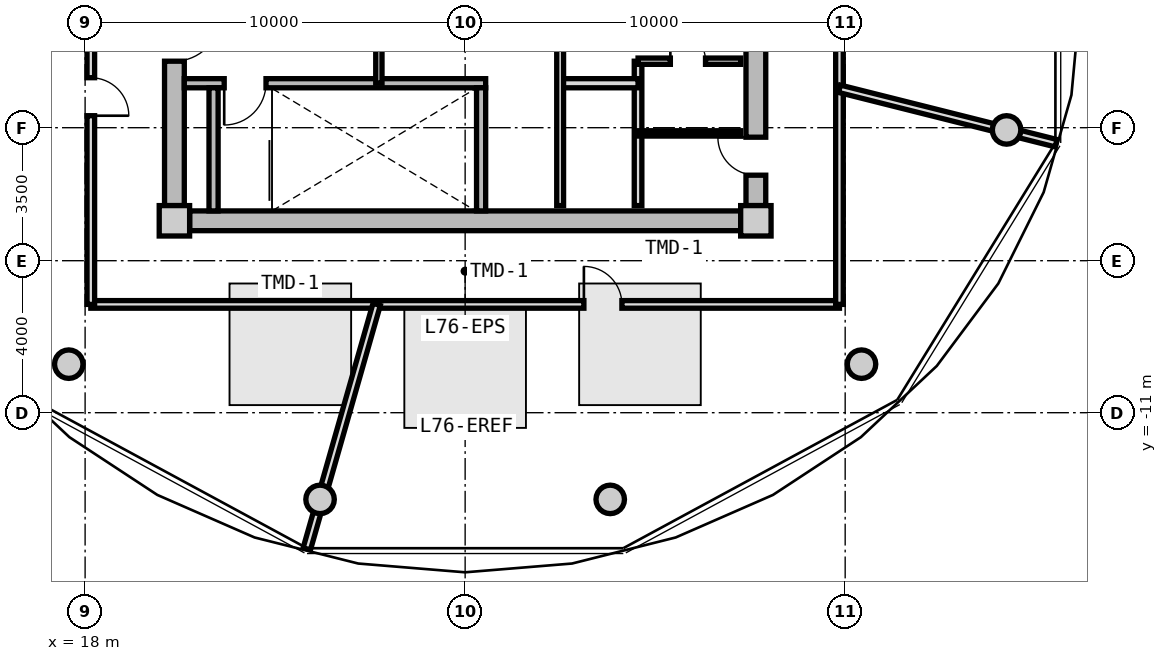
"""IFC4 building model, lengths in metres.
Left out: names, types, materials, properties, quantities, classifications, styles, units other than length and angle.
Written with IfcOpenShell. Run it as: python <this file> out.ifc"""

import sys

from ifc_helpers import new_model, si_unit, direction, frame, frame_2d, origin, origin_2d, place, context, subcontext, project, spatial, rectangle, circle, extrude, source, transform, mapped, element, fill, save


model = new_model("IFC4")
c1 = context("Model", 3, precision=1e-05, world=origin(), true_north=direction((0.0, 1.0)))
c2 = subcontext(c1, "Body", "Model", "MODEL_VIEW")
j1 = project(units=[si_unit("LENGTHUNIT", "METRE"), si_unit("PLANEANGLEUNIT", "RADIAN")], contexts=[c1])
p1 = place(None, origin())
s1 = spatial("IfcSite", under=j1, at=p1, CompositionType="ELEMENT")
p2 = place(p1, origin())
s2 = spatial("IfcBuilding", under=s1, at=p2, CompositionType="ELEMENT")
p3 = place(p2, frame((0.0, 0.0, 244.4)))
s3 = spatial("IfcBuildingStorey", under=s2, at=p3, CompositionType="ELEMENT", Elevation=244.4)
m1 = source(origin(), c2, "Body", "SweptSolid", [
    extrude(rectangle(XDim=0.8, YDim=0.8, at=origin_2d()), origin(), (0.0, 0.0, 1.0), 5.45),
])
for number, where, z_axis, x_axis in (
    (1, (20.35, -5.95, 0.0), (0.0, 0.0, 1.0), (1.0, 0.0, 0.0)),
    (2, (35.65, -5.95, 0.0), (0.0, 0.0, 1.0), (1.0, 0.0, 0.0)),
):
    element("IfcColumn", number, at=place(p3, frame(where, z_axis=z_axis, x_axis=x_axis)), inside=s3, PredefinedType="COLUMN", context=c2, shape_type="MappedRepresentation", body=[
        mapped(m1, transform((0.0, 0.0, 0.0), x_axis=(1.0, 0.0, 0.0), y_axis=(0.0, 1.0, 0.0), z_axis=(0.0, 0.0, 1.0), scale=1.0)),
    ])
m2 = source(origin(), c2, "Body", "SweptSolid", [
    extrude(rectangle(XDim=14.5, YDim=0.52, at=frame_2d((7.25, 0.0))), origin(), (0.0, 0.0, 1.0), 5.175),
])
p4 = place(p3, frame((35.25, -5.95, 0.0), z_axis=(0.0, 0.0, 1.0), x_axis=(-1.0, 0.0, 0.0)))
e3 = element("IfcWall", 3, at=p4, inside=s3, PredefinedType="SHEAR", context=c2, shape_type="MappedRepresentation", body=[
    mapped(m2, transform((0.0, 0.0, 0.0), x_axis=(1.0, 0.0, 0.0), y_axis=(0.0, 1.0, 0.0), z_axis=(0.0, 0.0, 1.0), scale=1.0)),
])
m3 = source(origin(), c2, "Body", "SweptSolid", [
    extrude(rectangle(XDim=11.1, YDim=0.52, at=frame_2d((5.55, 0.0))), origin(), (0.0, 0.0, 1.0), 5.175),
])
p5 = place(p3, frame((20.35, -5.55, 0.0), z_axis=(0.0, 0.0, 1.0), x_axis=(0.0, 1.0, 0.0)))
e4 = element("IfcWall", 4, at=p5, inside=s3, PredefinedType="SHEAR", context=c2, shape_type="MappedRepresentation", body=[
    mapped(m3, transform((0.0, 0.0, 0.0), x_axis=(1.0, 0.0, 0.0), y_axis=(0.0, 1.0, 0.0), z_axis=(0.0, 0.0, 1.0), scale=1.0)),
])
p6 = place(p5, frame((3.8, 0.0, 0.0)))
e5 = element("IfcOpeningElement", 5, at=p6, cuts=e4, PredefinedType="OPENING", context=c2, shape_type="SweptSolid", body=[
    extrude(rectangle(XDim=1.2, YDim=2.15, at=frame_2d((0.6, 1.075))), frame((0.0, 0.27, 0.0), z_axis=(0.0, -1.0, 0.0), x_axis=(1.0, 0.0, 0.0)), (0.0, 0.0, 1.0), 0.54),
])
p7 = place(p3, frame((35.65, 5.55, 0.0), z_axis=(0.0, 0.0, 1.0), x_axis=(0.0, -1.0, 0.0)))
e6 = element("IfcWall", 6, at=p7, inside=s3, PredefinedType="SHEAR", context=c2, shape_type="MappedRepresentation", body=[
    mapped(m3, transform((0.0, 0.0, 0.0), x_axis=(1.0, 0.0, 0.0), y_axis=(0.0, 1.0, 0.0), z_axis=(0.0, 0.0, 1.0), scale=1.0)),
])
p8 = place(p7, frame((5.65, 0.0, 0.0)))
e7 = element("IfcOpeningElement", 7, at=p8, cuts=e6, PredefinedType="OPENING", context=c2, shape_type="SweptSolid", body=[
    extrude(rectangle(XDim=1.2, YDim=2.15, at=frame_2d((0.6, 1.075))), frame((0.0, 0.27, 0.0), z_axis=(0.0, -1.0, 0.0), x_axis=(1.0, 0.0, 0.0)), (0.0, 0.0, 1.0), 0.54),
])
p9 = place(p7, frame((9.3, 0.0, 0.0)))
e8 = element("IfcOpeningElement", 8, at=p9, cuts=e6, PredefinedType="OPENING", context=c2, shape_type="SweptSolid", body=[
    extrude(rectangle(XDim=1.0, YDim=2.1, at=frame_2d((0.5, 1.05))), frame((0.0, 0.27, 0.0), z_axis=(0.0, -1.0, 0.0), x_axis=(1.0, 0.0, 0.0)), (0.0, 0.0, 1.0), 0.54),
])
m4 = source(origin(), c2, "Body", "SweptSolid", [
    extrude(circle(Radius=0.375, at=origin_2d()), origin(), (0.0, 0.0, 1.0), 5.45),
])
for number, where, z_axis, x_axis in (
    (9, (17.57, -9.723, 0.0), (0.0, 0.0, 1.0), (1.0, 0.0, 0.0)),
    (10, (24.182, -13.281, 0.0), (0.0, 0.0, 1.0), (1.0, 0.0, 0.0)),
    (11, (31.818, -13.281, 0.0), (0.0, 0.0, 1.0), (1.0, 0.0, 0.0)),
    (12, (38.43, -9.723, 0.0), (0.0, 0.0, 1.0), (1.0, 0.0, 0.0)),
    (13, (42.247, -3.559, 0.0), (0.0, 0.0, 1.0), (1.0, 0.0, 0.0)),
):
    element("IfcColumn", number, at=place(p3, frame(where, z_axis=z_axis, x_axis=x_axis)), inside=s3, PredefinedType="COLUMN", context=c2, shape_type="MappedRepresentation", body=[
        mapped(m4, transform((0.0, 0.0, 0.0), x_axis=(1.0, 0.0, 0.0), y_axis=(0.0, 1.0, 0.0), z_axis=(0.0, 0.0, 1.0), scale=1.0)),
    ])
m5 = source(origin(), c2, "Body", "SweptSolid", [
    extrude(rectangle(XDim=7.93, YDim=0.24, at=frame_2d((3.965, 0.0))), origin(), (0.0, 0.0, 1.0), 5.175),
])
p10 = place(p3, frame((20.61, -2.33, 0.0), z_axis=(0.0, 0.0, 1.0), x_axis=(1.0, 0.0, 0.0)))
e14 = element("IfcWall", 14, at=p10, inside=s3, PredefinedType="PARTITIONING", context=c2, shape_type="MappedRepresentation", body=[
    mapped(m5, transform((0.0, 0.0, 0.0), x_axis=(1.0, 0.0, 0.0), y_axis=(0.0, 1.0, 0.0), z_axis=(0.0, 0.0, 1.0), scale=1.0)),
])
p11 = place(p10, frame((1.05, 0.0, 0.0)))
e15 = element("IfcOpeningElement", 15, at=p11, cuts=e14, PredefinedType="OPENING", context=c2, shape_type="SweptSolid", body=[
    extrude(rectangle(XDim=1.1, YDim=2.15, at=frame_2d((0.55, 1.075))), frame((0.0, 0.13, 0.0), z_axis=(0.0, -1.0, 0.0), x_axis=(1.0, 0.0, 0.0)), (0.0, 0.0, 1.0), 0.26),
])
m6 = source(origin(), c2, "Body", "SweptSolid", [
    extrude(rectangle(XDim=3.24, YDim=0.24, at=frame_2d((1.62, 0.0))), origin(), (0.0, 0.0, 1.0), 5.175),
])
for number, where, z_axis, x_axis in (
    (16, (21.38, -5.69, 0.0), (0.0, 0.0, 1.0), (0.0, 1.0, 0.0)),
    (17, (28.42, -5.69, 0.0), (0.0, 0.0, 1.0), (0.0, 1.0, 0.0)),
):
    element("IfcWall", number, at=place(p3, frame(where, z_axis=z_axis, x_axis=x_axis)), inside=s3, PredefinedType="PARTITIONING", context=c2, shape_type="MappedRepresentation", body=[
        mapped(m6, transform((0.0, 0.0, 0.0), x_axis=(1.0, 0.0, 0.0), y_axis=(0.0, 1.0, 0.0), z_axis=(0.0, 0.0, 1.0), scale=1.0)),
    ])
m7 = source(origin(), c2, "Body", "SweptSolid", [
    extrude(rectangle(XDim=3.8, YDim=0.2, at=frame_2d((1.9, 0.0))), origin(), (0.0, 0.0, 1.0), 5.16),
])
p12 = place(p3, frame((32.55, -5.55, 0.0), z_axis=(0.0, 0.0, 1.0), x_axis=(0.0, 1.0, 0.0)))
e18 = element("IfcWall", 18, at=p12, inside=s3, PredefinedType="PARTITIONING", context=c2, shape_type="MappedRepresentation", body=[
    mapped(m7, transform((0.0, 0.0, 0.0), x_axis=(1.0, 0.0, 0.0), y_axis=(0.0, 1.0, 0.0), z_axis=(0.0, 0.0, 1.0), scale=1.0)),
])
m8 = source(origin(), c2, "Body", "SweptSolid", [
    extrude(rectangle(XDim=2.05, YDim=0.24, at=frame_2d((1.025, 0.0))), origin(), (0.0, 0.0, 1.0), 5.16),
])
p13 = place(p3, frame((30.5, -2.33, 0.0), z_axis=(0.0, 0.0, 1.0), x_axis=(1.0, 0.0, 0.0)))
e19 = element("IfcWall", 19, at=p13, inside=s3, PredefinedType="PARTITIONING", context=c2, shape_type="MappedRepresentation", body=[
    mapped(m8, transform((0.0, 0.0, 0.0), x_axis=(1.0, 0.0, 0.0), y_axis=(0.0, 1.0, 0.0), z_axis=(0.0, 0.0, 1.0), scale=1.0)),
])
m9 = source(origin(), c2, "Body", "SweptSolid", [
    extrude(rectangle(XDim=4.2, YDim=0.18, at=frame_2d((2.1, 0.0))), origin(), (0.0, 0.0, 1.0), 5.16),
])
p14 = place(p3, frame((30.5, -5.55, 0.0), z_axis=(0.0, 0.0, 1.0), x_axis=(0.0, 1.0, 0.0)))
e20 = element("IfcWall", 20, at=p14, inside=s3, PredefinedType="PARTITIONING", context=c2, shape_type="MappedRepresentation", body=[
    mapped(m9, transform((0.0, 0.0, 0.0), x_axis=(1.0, 0.0, 0.0), y_axis=(0.0, 1.0, 0.0), z_axis=(0.0, 0.0, 1.0), scale=1.0)),
])
m10 = source(origin(), c2, "Body", "SweptSolid", [
    extrude(rectangle(XDim=0.98, YDim=0.165, at=frame_2d((0.49, 0.0))), origin(), (0.0, 0.0, 1.0), 5.16),
])
p15 = place(p3, frame((25.73, -2.33, 0.0), z_axis=(0.0, 0.0, 1.0), x_axis=(0.0, 1.0, 0.0)))
e21 = element("IfcWall", 21, at=p15, inside=s3, PredefinedType="PARTITIONING", context=c2, shape_type="MappedRepresentation", body=[
    mapped(m10, transform((0.0, 0.0, 0.0), x_axis=(1.0, 0.0, 0.0), y_axis=(0.0, 1.0, 0.0), z_axis=(0.0, 0.0, 1.0), scale=1.0)),
])
m11 = source(origin(), c2, "Body", "SweptSolid", [
    extrude(rectangle(XDim=2.7, YDim=0.165, at=frame_2d((1.35, 0.0))), origin(), (0.0, 0.0, 1.0), 5.16),
])
p16 = place(p3, frame((32.55, -1.75, 0.0), z_axis=(0.0, 0.0, 1.0), x_axis=(1.0, 0.0, 0.0)))
e22 = element("IfcWall", 22, at=p16, inside=s3, PredefinedType="PARTITIONING", context=c2, shape_type="MappedRepresentation", body=[
    mapped(m11, transform((0.0, 0.0, 0.0), x_axis=(1.0, 0.0, 0.0), y_axis=(0.0, 1.0, 0.0), z_axis=(0.0, 0.0, 1.0), scale=1.0)),
])
p17 = place(p16, frame((0.85, 0.0, 0.0)))
e23 = element("IfcOpeningElement", 23, at=p17, cuts=e22, PredefinedType="OPENING", context=c2, shape_type="SweptSolid", body=[
    extrude(rectangle(XDim=0.925, YDim=2.1, at=frame_2d((0.462, 1.05))), frame((0.0, 0.093, 0.0), z_axis=(0.0, -1.0, 0.0), x_axis=(1.0, 0.0, 0.0)), (0.0, 0.0, 1.0), 0.185),
])
m12 = source(origin(), c2, "Body", "SweptSolid", [
    extrude(rectangle(XDim=2.7, YDim=0.14, at=frame_2d((1.35, 0.0))), origin(), (0.0, 0.0, 1.0), 5.16),
])
p18 = place(p3, frame((32.55, -3.65, 0.0), z_axis=(0.0, 0.0, 1.0), x_axis=(1.0, 0.0, 0.0)))
e24 = element("IfcWall", 24, at=p18, inside=s3, PredefinedType="PARTITIONING", context=c2, shape_type="MappedRepresentation", body=[
    mapped(m12, transform((0.0, 0.0, 0.0), x_axis=(1.0, 0.0, 0.0), y_axis=(0.0, 1.0, 0.0), z_axis=(0.0, 0.0, 1.0), scale=1.0)),
])
m13 = source(origin(), c2, "Body", "SweptSolid", [
    extrude(rectangle(XDim=19.7, YDim=0.2, at=frame_2d((9.85, 0.0))), origin(), (0.0, 0.0, 1.0), 5.16),
])
p19 = place(p3, frame((37.85, -8.15, 0.0), z_axis=(0.0, 0.0, 1.0), x_axis=(-1.0, 0.0, 0.0)))
e25 = element("IfcWall", 25, at=p19, inside=s3, PredefinedType="PARTITIONING", context=c2, shape_type="MappedRepresentation", body=[
    mapped(m13, transform((0.0, 0.0, 0.0), x_axis=(1.0, 0.0, 0.0), y_axis=(0.0, 1.0, 0.0), z_axis=(0.0, 0.0, 1.0), scale=1.0)),
])
p20 = place(p19, frame((5.725, 0.0, 0.0)))
e26 = element("IfcOpeningElement", 26, at=p20, cuts=e25, PredefinedType="OPENING", context=c2, shape_type="SweptSolid", body=[
    extrude(rectangle(XDim=1.0, YDim=2.1, at=frame_2d((0.5, 1.05))), frame((0.0, 0.11, 0.0), z_axis=(0.0, -1.0, 0.0), x_axis=(1.0, 0.0, 0.0)), (0.0, 0.0, 1.0), 0.22),
])
m14 = source(origin(), c2, "Body", "SweptSolid", [
    extrude(rectangle(XDim=16.3, YDim=0.2, at=frame_2d((8.15, 0.0))), origin(), (0.0, 0.0, 1.0), 5.16),
])
p21 = place(p3, frame((18.15, -8.15, 0.0), z_axis=(0.0, 0.0, 1.0), x_axis=(0.0, 1.0, 0.0)))
e27 = element("IfcWall", 27, at=p21, inside=s3, PredefinedType="PARTITIONING", context=c2, shape_type="MappedRepresentation", body=[
    mapped(m14, transform((0.0, 0.0, 0.0), x_axis=(1.0, 0.0, 0.0), y_axis=(0.0, 1.0, 0.0), z_axis=(0.0, 0.0, 1.0), scale=1.0)),
])
p22 = place(p21, frame((4.966, 0.0, 0.0)))
e28 = element("IfcOpeningElement", 28, at=p22, cuts=e27, PredefinedType="OPENING", context=c2, shape_type="SweptSolid", body=[
    extrude(rectangle(XDim=1.0, YDim=2.1, at=frame_2d((0.5, 1.05))), frame((0.0, 0.11, 0.0), z_axis=(0.0, -1.0, 0.0), x_axis=(1.0, 0.0, 0.0)), (0.0, 0.0, 1.0), 0.22),
])
p23 = place(p3, frame((37.85, 8.15, 0.0), z_axis=(0.0, 0.0, 1.0), x_axis=(0.0, -1.0, 0.0)))
e29 = element("IfcWall", 29, at=p23, inside=s3, PredefinedType="PARTITIONING", context=c2, shape_type="MappedRepresentation", body=[
    mapped(m14, transform((0.0, 0.0, 0.0), x_axis=(1.0, 0.0, 0.0), y_axis=(0.0, 1.0, 0.0), z_axis=(0.0, 0.0, 1.0), scale=1.0)),
])
p24 = place(p23, frame((4.966, 0.0, 0.0)))
e30 = element("IfcOpeningElement", 30, at=p24, cuts=e29, PredefinedType="OPENING", context=c2, shape_type="SweptSolid", body=[
    extrude(rectangle(XDim=1.0, YDim=2.1, at=frame_2d((0.5, 1.05))), frame((0.0, 0.11, 0.0), z_axis=(0.0, -1.0, 0.0), x_axis=(1.0, 0.0, 0.0)), (0.0, 0.0, 1.0), 0.22),
])
m15 = source(origin(), c2, "Body", "SweptSolid", [
    extrude(rectangle(XDim=6.693, YDim=0.2, at=frame_2d((3.347, 0.0))), origin(), (0.0, 0.0, 1.0), 4.76),
])
p25 = place(p3, frame((25.672, -8.15, 0.0), z_axis=(0.0, 0.0, 1.0), x_axis=(-0.2747066748, -0.96152807698, 0.0)))
e31 = element("IfcWall", 31, at=p25, inside=s3, PredefinedType="PARTITIONING", context=c2, shape_type="MappedRepresentation", body=[
    mapped(m15, transform((0.0, 0.0, 0.0), x_axis=(1.0, 0.0, 0.0), y_axis=(0.0, 1.0, 0.0), z_axis=(0.0, 0.0, 1.0), scale=1.0)),
])
m16 = source(origin(), c2, "Body", "SweptSolid", [
    extrude(rectangle(XDim=5.879, YDim=0.2, at=frame_2d((2.939, 0.0))), origin(), (0.0, 0.0, 1.0), 4.76),
])
p26 = place(p3, frame((37.85, -2.475, 0.0), z_axis=(0.0, 0.0, 1.0), x_axis=(0.96984127658, -0.24373735504, 0.0)))
e32 = element("IfcWall", 32, at=p26, inside=s3, PredefinedType="PARTITIONING", context=c2, shape_type="MappedRepresentation", body=[
    mapped(m16, transform((0.0, 0.0, 0.0), x_axis=(1.0, 0.0, 0.0), y_axis=(0.0, 1.0, 0.0), z_axis=(0.0, 0.0, 1.0), scale=1.0)),
])
m17 = source(origin(), c2, "Body", "SweptSolid", [
    extrude(rectangle(XDim=1.1, YDim=2.15, at=frame_2d((0.55, 1.075))), frame((0.0, 0.025, 0.0), z_axis=(0.0, -1.0, 0.0), x_axis=(1.0, 0.0, 0.0)), (0.0, 0.0, 1.0), 0.05),
])
p27 = place(p11, frame((1.1, 0.0, 0.0), z_axis=(0.0, 0.0, 1.0), x_axis=(-1.0, 0.0, 0.0)))
e33 = element("IfcDoor", 33, at=p27, inside=s3, OperationType="SINGLE_SWING_RIGHT", PredefinedType="DOOR", context=c2, shape_type="MappedRepresentation", body=[
    mapped(m17, transform((0.0, 0.0, 0.0), x_axis=(1.0, 0.0, 0.0), y_axis=(0.0, 1.0, 0.0), z_axis=(0.0, 0.0, 1.0), scale=1.0)),
])
fill(e15, e33)
m18 = source(origin(), c2, "Body", "SweptSolid", [
    extrude(rectangle(XDim=1.2, YDim=2.15, at=frame_2d((0.6, 1.075))), frame((0.0, 0.025, 0.0), z_axis=(0.0, -1.0, 0.0), x_axis=(1.0, 0.0, 0.0)), (0.0, 0.0, 1.0), 0.05),
])
p28 = place(p6, frame((1.2, 0.0, 0.0), z_axis=(0.0, 0.0, 1.0), x_axis=(-1.0, 0.0, 0.0)))
e34 = element("IfcDoor", 34, at=p28, inside=s3, OperationType="SINGLE_SWING_LEFT", PredefinedType="DOOR", context=c2, shape_type="MappedRepresentation", body=[
    mapped(m18, transform((0.0, 0.0, 0.0), x_axis=(1.0, 0.0, 0.0), y_axis=(0.0, 1.0, 0.0), z_axis=(0.0, 0.0, 1.0), scale=1.0)),
])
fill(e5, e34)
m19 = source(origin(), c2, "Body", "SweptSolid", [
    extrude(rectangle(XDim=0.925, YDim=2.1, at=frame_2d((0.462, 1.05))), frame((0.0, 0.025, 0.0), z_axis=(0.0, -1.0, 0.0), x_axis=(1.0, 0.0, 0.0)), (0.0, 0.0, 1.0), 0.05),
])
p29 = place(p17, origin())
e35 = element("IfcDoor", 35, at=p29, inside=s3, OperationType="SINGLE_SWING_LEFT", PredefinedType="DOOR", context=c2, shape_type="MappedRepresentation", body=[
    mapped(m19, transform((0.0, 0.0, 0.0), x_axis=(1.0, 0.0, 0.0), y_axis=(0.0, 1.0, 0.0), z_axis=(0.0, 0.0, 1.0), scale=1.0)),
])
fill(e23, e35)
m20 = source(origin(), c2, "Body", "SweptSolid", [
    extrude(rectangle(XDim=1.0, YDim=2.1, at=frame_2d((0.5, 1.05))), frame((0.0, 0.025, 0.0), z_axis=(0.0, -1.0, 0.0), x_axis=(1.0, 0.0, 0.0)), (0.0, 0.0, 1.0), 0.05),
])
p30 = place(p9, frame((1.0, 0.0, 0.0), z_axis=(0.0, 0.0, 1.0), x_axis=(-1.0, 0.0, 0.0)))
e36 = element("IfcDoor", 36, at=p30, inside=s3, OperationType="SINGLE_SWING_RIGHT", PredefinedType="DOOR", context=c2, shape_type="MappedRepresentation", body=[
    mapped(m20, transform((0.0, 0.0, 0.0), x_axis=(1.0, 0.0, 0.0), y_axis=(0.0, 1.0, 0.0), z_axis=(0.0, 0.0, 1.0), scale=1.0)),
])
fill(e8, e36)
p31 = place(p20, frame((1.0, 0.0, 0.0), z_axis=(0.0, 0.0, 1.0), x_axis=(-1.0, 0.0, 0.0)))
e37 = element("IfcDoor", 37, at=p31, inside=s3, OperationType="SINGLE_SWING_LEFT", PredefinedType="DOOR", context=c2, shape_type="MappedRepresentation", body=[
    mapped(m20, transform((0.0, 0.0, 0.0), x_axis=(1.0, 0.0, 0.0), y_axis=(0.0, 1.0, 0.0), z_axis=(0.0, 0.0, 1.0), scale=1.0)),
])
fill(e26, e37)
p32 = place(p22, frame((1.0, 0.0, 0.0), z_axis=(0.0, 0.0, 1.0), x_axis=(-1.0, 0.0, 0.0)))
e38 = element("IfcDoor", 38, at=p32, inside=s3, OperationType="SINGLE_SWING_RIGHT", PredefinedType="DOOR", context=c2, shape_type="MappedRepresentation", body=[
    mapped(m20, transform((0.0, 0.0, 0.0), x_axis=(1.0, 0.0, 0.0), y_axis=(0.0, 1.0, 0.0), z_axis=(0.0, 0.0, 1.0), scale=1.0)),
])
fill(e28, e38)
save(model, sys.argv[1])
